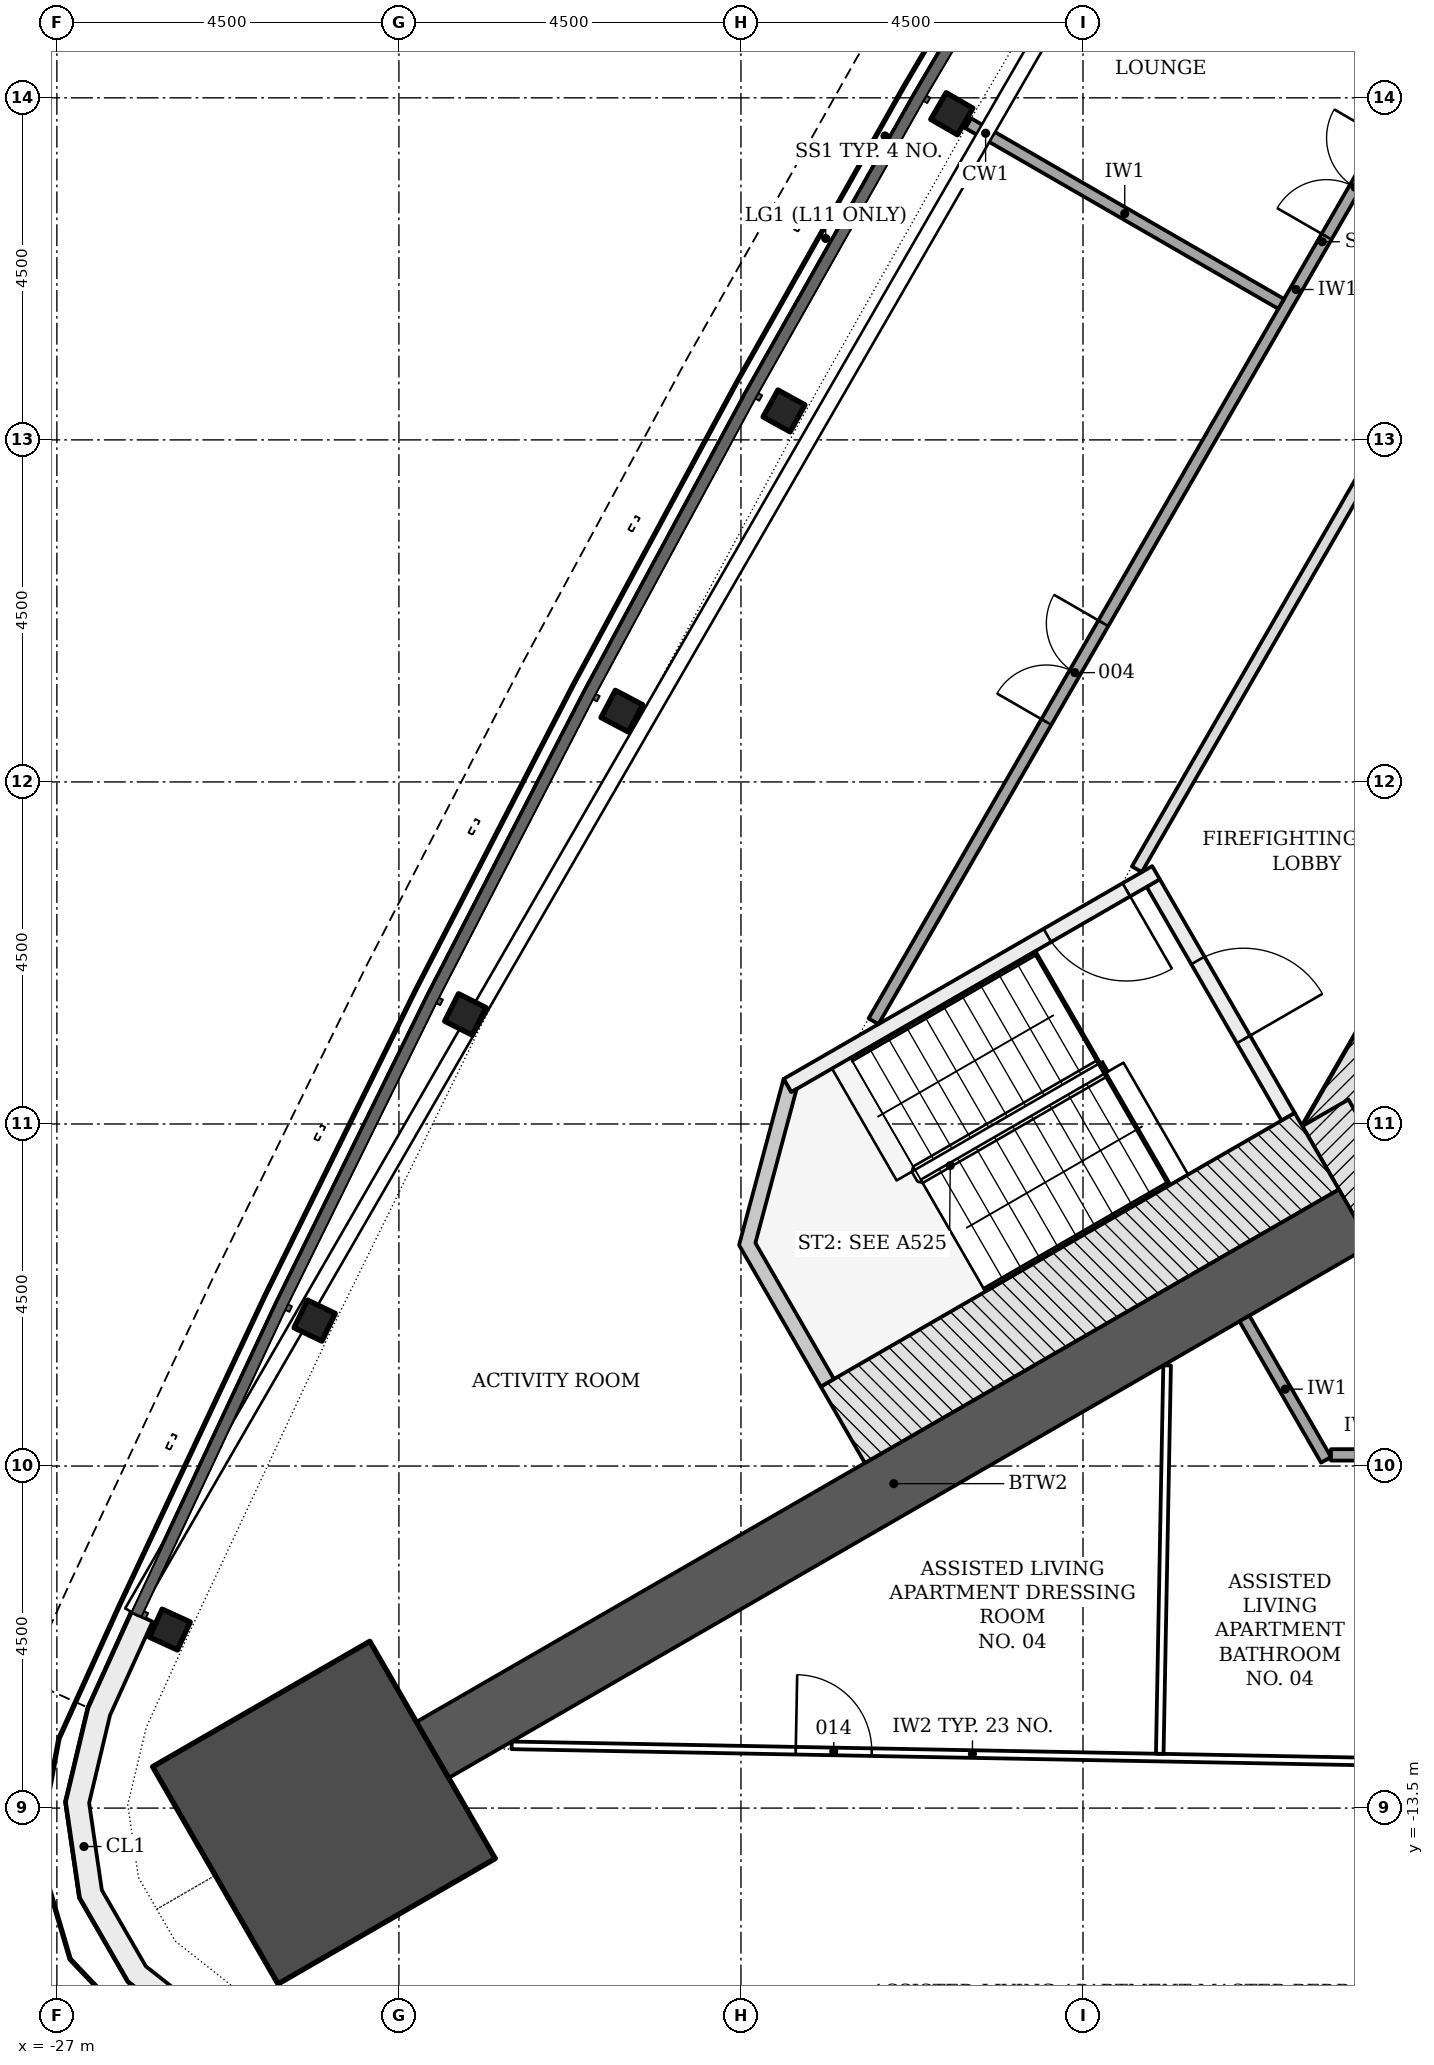
"""IFC4 building model, lengths in metres.
Left out: names, types, materials, properties, quantities, classifications, styles, units other than length and angle.
Written with IfcOpenShell. Run it as: python <this file> out.ifc"""

import sys

from ifc_helpers import new_model, si_unit, direction, frame, frame_2d, origin, origin_2d, place, context, subcontext, project, spatial, polyline, rectangle, i_section, outline, extrude, element, fill, save


model = new_model("IFC4")
c1 = context("Model", 3, precision=1e-05, world=origin(), true_north=direction((0.0, 1.0)))
c2 = subcontext(c1, "Body", "Model", "MODEL_VIEW")
j1 = project(units=[si_unit("LENGTHUNIT", "METRE"), si_unit("PLANEANGLEUNIT", "RADIAN")], contexts=[c1])
p1 = place(None, origin())
s1 = spatial("IfcSite", under=j1, at=p1, CompositionType="ELEMENT")
p2 = place(p1, origin())
s2 = spatial("IfcBuilding", under=s1, at=p2, CompositionType="ELEMENT")
p3 = place(p2, frame((0.0, 0.0, 45.6)))
s3 = spatial("IfcBuildingStorey", under=s2, at=p3, CompositionType="ELEMENT", Elevation=45.6)
p4 = place(p3, frame((-1.083, 11.281, -0.2), z_axis=(0.0, 0.0, 1.0), x_axis=(-0.500001446645, -0.866024568562, 0.0)))
e1 = element("IfcWall", 1, at=p4, inside=s3, PredefinedType="SHEAR", context=c2, shape_type="SweptSolid", body=[
    extrude(rectangle(XDim=18.458, YDim=0.7, at=frame_2d((9.229, 0.0))), origin(), (0.0, 0.0, 1.0), 3.6),
])
p5 = place(p4, frame((8.979, 0.0, 0.2)))
e2 = element("IfcOpeningElement", 2, at=p5, cuts=e1, PredefinedType="OPENING", context=c2, shape_type="SweptSolid", body=[
    extrude(rectangle(XDim=1.2, YDim=2.1, at=frame_2d((0.6, 1.05))), frame((0.0, 0.36, 0.0), z_axis=(0.0, -1.0, 0.0), x_axis=(1.0, 0.0, 0.0)), (0.0, 0.0, 1.0), 0.72),
])
p6 = place(p4, frame((11.029, 0.0, 0.2)))
e3 = element("IfcOpeningElement", 3, at=p6, cuts=e1, PredefinedType="OPENING", context=c2, shape_type="SweptSolid", body=[
    extrude(rectangle(XDim=1.2, YDim=2.1, at=frame_2d((0.6, 1.05))), frame((0.0, 0.36, 0.0), z_axis=(0.0, -1.0, 0.0), x_axis=(1.0, 0.0, 0.0)), (0.0, 0.0, 1.0), 0.72),
])
p7 = place(p3, frame((-10.311, -4.353, -0.2), z_axis=(0.0, 0.0, 1.0), x_axis=(0.500042739161, -0.866000726912, 0.0)))
e4 = element("IfcWall", 4, at=p7, inside=s3, PredefinedType="SHEAR", context=c2, shape_type="SweptSolid", body=[
    extrude(rectangle(XDim=2.771, YDim=0.7, at=frame_2d((1.386, 0.0))), origin(), (0.0, 0.0, 1.0), 3.6),
])
p8 = place(p3, frame((-9.922, -5.728, -0.2), z_axis=(0.0, 0.0, 1.0), x_axis=(-0.866021666006, -0.500006473966, 0.0)))
e5 = element("IfcWall", 5, at=p8, inside=s3, PredefinedType="SHEAR", context=c2, shape_type="SweptSolid", body=[
    extrude(rectangle(XDim=14.013, YDim=0.85, at=frame_2d((7.007, 0.0))), origin(), (0.0, 0.0, 1.0), 3.6),
])
p9 = place(p3, frame((-23.487, -13.56, -0.2), z_axis=(0.0, 0.0, 1.0), x_axis=(-0.866025403784, -0.5, 0.0)))
e6 = element("IfcColumn", 6, at=p9, inside=s3, PredefinedType="COLUMN", context=c2, shape_type="SweptSolid", body=[
    extrude(rectangle(XDim=3.3, YDim=3.3, at=origin_2d()), origin(), (0.0, 0.0, 1.0), 3.6),
])
for number, where, z_axis, x_axis in (
    (7, (-15.226, 8.791, -0.2), (0.0, 0.0, 1.0), (-0.5, -0.866, 0.0)),
    (8, (-17.434, 4.882, -0.2), (0.0, 0.0, 1.0), (-0.484, -0.875, 0.0)),
    (9, (-19.567, 0.931, -0.2), (0.0, 0.0, 1.0), (-0.467, -0.884, 0.0)),
    (10, (-21.626, -3.059, -0.2), (0.0, 0.0, 1.0), (-0.45, -0.893, 0.0)),
    (11, (-23.608, -7.086, -0.2), (0.0, 0.0, 1.0), (-0.433, -0.901, 0.0)),
    (12, (-25.514, -11.151, -0.2), (0.0, 0.0, 1.0), (-0.416, -0.909, 0.0)),
):
    element("IfcColumn", number, at=place(p3, frame(where, z_axis=z_axis, x_axis=x_axis)), inside=s3, PredefinedType="COLUMN", context=c2, shape_type="SweptSolid", body=[
        extrude(i_section(OverallWidth=0.404, OverallDepth=0.406, WebThickness=0.027, FlangeThickness=0.044, FilletRadius=0.015, at=origin_2d()), origin(), (0.0, 0.0, 1.0), 3.6),
    ])
p10 = place(p3, origin())
e13 = element("IfcWall", 13, at=p10, inside=s3, PredefinedType="NOTDEFINED", context=c2, shape_type="SweptSolid", body=[
    extrude(outline(polyline([(-26.014, -10.923), (-26.586, -12.181), (-26.881, -13.419), (-26.697, -14.679), (-26.061, -15.781), (-25.062, -16.57), (-23.842, -16.933), (-22.467, -17.068), (-22.437, -16.769), (-23.784, -16.638), (-24.921, -16.299), (-25.829, -15.581), (-26.408, -14.578), (-26.575, -13.433), (-26.301, -12.279), (-25.741, -11.047), (-26.014, -10.923)])), origin(), (0.0, 0.0, 1.0), 3.3),
])
p11 = place(p3, frame((-12.576, -1.331, -0.2), z_axis=(0.0, 0.0, 1.0), x_axis=(0.499970499736, -0.8660424351, 0.0)))
e14 = element("IfcWall", 14, at=p11, inside=s3, PredefinedType="SHEAR", context=c2, shape_type="SweptSolid", body=[
    extrude(rectangle(XDim=3.55, YDim=0.2, at=frame_2d((1.775, 0.0))), origin(), (0.0, 0.0, 1.0), 3.6),
])
p12 = place(p11, frame((1.175, 0.0, 0.2)))
e15 = element("IfcOpeningElement", 15, at=p12, cuts=e14, PredefinedType="OPENING", context=c2, shape_type="SweptSolid", body=[
    extrude(rectangle(XDim=1.2, YDim=2.1, at=frame_2d((0.6, 1.05))), frame((0.0, 0.11, 0.0), z_axis=(0.0, -1.0, 0.0), x_axis=(1.0, 0.0, 0.0)), (0.0, 0.0, 1.0), 0.22),
])
p13 = place(p3, frame((-12.539, -1.194, -0.2), z_axis=(0.0, 0.0, 1.0), x_axis=(-0.866045472092, -0.499965239061, 0.0)))
e16 = element("IfcWall", 16, at=p13, inside=s3, PredefinedType="SHEAR", context=c2, shape_type="SweptSolid", body=[
    extrude(rectangle(XDim=5.6, YDim=0.2, at=frame_2d((2.8, 0.0))), origin(), (0.0, 0.0, 1.0), 3.6),
])
p14 = place(p13, frame((0.45, 0.0, 0.2)))
e17 = element("IfcOpeningElement", 17, at=p14, cuts=e16, PredefinedType="OPENING", context=c2, shape_type="SweptSolid", body=[
    extrude(rectangle(XDim=1.2, YDim=2.1, at=frame_2d((0.6, 1.05))), frame((0.0, 0.11, 0.0), z_axis=(0.0, -1.0, 0.0), x_axis=(1.0, 0.0, 0.0)), (0.0, 0.0, 1.0), 0.22),
])
p15 = place(p3, frame((-10.424, -4.858, -0.2), z_axis=(0.0, 0.0, 1.0), x_axis=(-0.866033125095, -0.499986626058, 0.0)))
e18 = element("IfcWall", 18, at=p15, inside=s3, PredefinedType="SHEAR", context=c2, shape_type="SweptSolid", body=[
    extrude(rectangle(XDim=7.2, YDim=1.161, at=frame_2d((3.6, 0.0))), origin(), (0.0, 0.0, 1.0), 3.6),
])
p16 = place(p3, frame((0.0, 0.0, -0.2)))
e19 = element("IfcWall", 19, at=p16, inside=s3, PredefinedType="SHEAR", context=c2, shape_type="SweptSolid", body=[
    extrude(outline(polyline([(-17.439, -3.907), (-18.025, -6.093), (-16.95, -7.955), (-16.777, -7.855), (-17.81, -6.065), (-17.267, -4.039), (-17.339, -4.081), (-17.339, -4.081), (-17.339, -4.081), (-17.339, -4.081), (-17.339, -4.081), (-17.339, -4.081), (-17.339, -4.081), (-17.339, -4.081), (-17.339, -4.081), (-17.339, -4.081), (-17.339, -4.081), (-17.339, -4.081), (-17.339, -4.081), (-17.339, -4.081), (-17.339, -4.081), (-17.339, -4.081), (-17.339, -4.081), (-17.439, -3.907)])), origin(), (0.0, 0.0, 1.0), 3.6),
])
p17 = place(p3, frame((-16.256, -3.149, 0.0), z_axis=(0.0, 0.0, 1.0), x_axis=(0.499999683919, 0.866025586274, 0.0)))
e20 = element("IfcWall", 20, at=p17, inside=s3, PredefinedType="PARTITIONING", context=c2, shape_type="SweptSolid", body=[
    extrude(rectangle(XDim=22.234, YDim=0.15, at=frame_2d((11.117, 0.0))), origin(), (0.0, 0.0, 1.0), 2.778),
])
p18 = place(p17, frame((17.842, 0.0, 0.0)))
e21 = element("IfcOpeningElement", 21, at=p18, cuts=e20, PredefinedType="OPENING", context=c2, shape_type="SweptSolid", body=[
    extrude(rectangle(XDim=1.0, YDim=2.1, at=frame_2d((0.5, 1.05))), frame((0.0, 0.085, 0.0), z_axis=(0.0, -1.0, 0.0), x_axis=(1.0, 0.0, 0.0)), (0.0, 0.0, 1.0), 0.17),
])
p19 = place(p17, frame((15.26, 0.0, 0.0)))
e22 = element("IfcOpeningElement", 22, at=p19, cuts=e20, PredefinedType="OPENING", context=c2, shape_type="SweptSolid", body=[
    extrude(rectangle(XDim=1.0, YDim=2.1, at=frame_2d((0.5, 1.05))), frame((0.0, 0.085, 0.0), z_axis=(0.0, -1.0, 0.0), x_axis=(1.0, 0.0, 0.0)), (0.0, 0.0, 1.0), 0.17),
])
p20 = place(p17, frame((11.92, 0.0, 0.0)))
e23 = element("IfcOpeningElement", 23, at=p20, cuts=e20, PredefinedType="OPENING", context=c2, shape_type="SweptSolid", body=[
    extrude(rectangle(XDim=1.5, YDim=2.1, at=frame_2d((0.75, 1.05))), frame((0.0, 0.085, 0.0), z_axis=(0.0, -1.0, 0.0), x_axis=(1.0, 0.0, 0.0)), (0.0, 0.0, 1.0), 0.17),
])
p21 = place(p17, frame((4.547, 0.0, 0.0)))
e24 = element("IfcOpeningElement", 24, at=p21, cuts=e20, PredefinedType="OPENING", context=c2, shape_type="SweptSolid", body=[
    extrude(rectangle(XDim=1.5, YDim=2.1, at=frame_2d((0.75, 1.05))), frame((0.0, 0.085, 0.0), z_axis=(0.0, -1.0, 0.0), x_axis=(1.0, 0.0, 0.0)), (0.0, 0.0, 1.0), 0.17),
])
p22 = place(p3, frame((-4.407, 13.374, 0.0), z_axis=(0.0, 0.0, 1.0), x_axis=(-0.499997181693, -0.866027030928, 0.0)))
e25 = element("IfcWall", 25, at=p22, inside=s3, PredefinedType="PARTITIONING", context=c2, shape_type="SweptSolid", body=[
    extrude(rectangle(XDim=16.77, YDim=0.15, at=frame_2d((8.385, 0.0))), origin(), (0.0, 0.0, 1.0), 2.778),
])
p23 = place(p22, frame((8.879, 0.0, 0.0)))
e26 = element("IfcOpeningElement", 26, at=p23, cuts=e25, PredefinedType="OPENING", context=c2, shape_type="SweptSolid", body=[
    extrude(rectangle(XDim=1.0, YDim=2.1, at=frame_2d((0.5, 1.05))), frame((0.0, 0.085, 0.0), z_axis=(0.0, -1.0, 0.0), x_axis=(1.0, 0.0, 0.0)), (0.0, 0.0, 1.0), 0.17),
])
p24 = place(p3, frame((-11.376, -7.059, 0.0), z_axis=(0.0, 0.0, 1.0), x_axis=(0.500076779081, -0.865981070823, 0.0)))
e27 = element("IfcWall", 27, at=p24, inside=s3, PredefinedType="PARTITIONING", context=c2, shape_type="SweptSolid", body=[
    extrude(rectangle(XDim=2.147, YDim=0.15, at=frame_2d((1.074, 0.0))), origin(), (0.0, 0.0, 1.0), 3.4),
])
p25 = place(p3, frame((-10.238, -8.853, 0.0), z_axis=(0.0, 0.0, 1.0), x_axis=(1.0, 0.0, 0.0)))
e28 = element("IfcWall", 28, at=p25, inside=s3, PredefinedType="PARTITIONING", context=c2, shape_type="SweptSolid", body=[
    extrude(rectangle(XDim=0.859, YDim=0.15, at=frame_2d((0.43, 0.0))), origin(), (0.0, 0.0, 1.0), 3.4),
])
p26 = place(p3, frame((-15.009, 8.666, 0.0), z_axis=(0.0, 0.0, 1.0), x_axis=(0.866028196007, -0.499995163697, 0.0)))
e29 = element("IfcWall", 29, at=p26, inside=s3, PredefinedType="PARTITIONING", context=c2, shape_type="SweptSolid", body=[
    extrude(rectangle(XDim=4.753, YDim=0.15, at=frame_2d((2.376, 0.0))), origin(), (0.0, 0.0, 1.0), 2.778),
])
p27 = place(p3, frame((-21.017, -12.675, 0.0), z_axis=(0.0, 0.0, 1.0), x_axis=(0.999821316728, -0.018903296414, 0.0)))
e30 = element("IfcWall", 30, at=p27, inside=s3, PredefinedType="PARTITIONING", context=c2, shape_type="SweptSolid", body=[
    extrude(rectangle(XDim=12.127, YDim=0.1, at=frame_2d((6.064, 0.0))), origin(), (0.0, 0.0, 1.0), 2.778),
])
p28 = place(p27, frame((3.739, 0.0, 0.0)))
e31 = element("IfcOpeningElement", 31, at=p28, cuts=e30, PredefinedType="OPENING", context=c2, shape_type="SweptSolid", body=[
    extrude(rectangle(XDim=1.0, YDim=2.1, at=frame_2d((0.5, 1.05))), frame((0.0, 0.06, 0.0), z_axis=(0.0, -1.0, 0.0), x_axis=(1.0, 0.0, 0.0)), (0.0, 0.0, 1.0), 0.12),
])
p29 = place(p3, frame((-12.49, -12.786, 0.0), z_axis=(0.0, 0.0, 1.0), x_axis=(0.018916824658, 0.999821060863, 0.0)))
e32 = element("IfcWall", 32, at=p29, inside=s3, PredefinedType="PARTITIONING", context=c2, shape_type="SweptSolid", body=[
    extrude(rectangle(XDim=5.111, YDim=0.1, at=frame_2d((2.555, 0.0))), origin(), (0.0, 0.0, 1.0), 3.4),
])
p30 = place(p3, frame((-10.96, 10.538, 0.0), z_axis=(0.0, 0.0, 1.0), x_axis=(0.856405167788, -0.516304356544, 0.0)))
e33 = element("IfcWall", 33, at=p30, inside=s3, PredefinedType="PARTITIONING", context=c2, shape_type="SweptSolid", body=[
    extrude(rectangle(XDim=2.182, YDim=0.1, at=frame_2d((1.091, 0.0))), origin(), (0.0, 0.0, 1.0), 3.4),
])
p31 = place(p12, origin())
e34 = element("IfcDoor", 34, at=p31, inside=s3, OperationType="SINGLE_SWING_RIGHT", PredefinedType="DOOR", context=c2, shape_type="SweptSolid", body=[
    extrude(rectangle(XDim=1.2, YDim=2.1, at=frame_2d((0.6, 1.05))), frame((0.0, 0.025, 0.0), z_axis=(0.0, -1.0, 0.0), x_axis=(1.0, 0.0, 0.0)), (0.0, 0.0, 1.0), 0.05),
])
fill(e15, e34)
p32 = place(p14, origin())
e35 = element("IfcDoor", 35, at=p32, inside=s3, OperationType="SINGLE_SWING_LEFT", PredefinedType="DOOR", context=c2, shape_type="SweptSolid", body=[
    extrude(rectangle(XDim=1.2, YDim=2.1, at=frame_2d((0.6, 1.05))), frame((0.0, 0.025, 0.0), z_axis=(0.0, -1.0, 0.0), x_axis=(1.0, 0.0, 0.0)), (0.0, 0.0, 1.0), 0.05),
])
fill(e17, e35)
p33 = place(p20, origin())
e36 = element("IfcDoor", 36, at=p33, inside=s3, OperationType="DOUBLE_DOOR_SINGLE_SWING", PredefinedType="DOOR", context=c2, shape_type="SweptSolid", body=[
    extrude(rectangle(XDim=1.5, YDim=2.1, at=frame_2d((0.75, 1.05))), frame((0.0, 0.025, 0.0), z_axis=(0.0, -1.0, 0.0), x_axis=(1.0, 0.0, 0.0)), (0.0, 0.0, 1.0), 0.05),
])
fill(e23, e36)
p34 = place(p21, origin())
e37 = element("IfcDoor", 37, at=p34, inside=s3, OperationType="DOUBLE_DOOR_SINGLE_SWING", PredefinedType="DOOR", context=c2, shape_type="SweptSolid", body=[
    extrude(rectangle(XDim=1.5, YDim=2.1, at=frame_2d((0.75, 1.05))), frame((0.0, 0.025, 0.0), z_axis=(0.0, -1.0, 0.0), x_axis=(1.0, 0.0, 0.0)), (0.0, 0.0, 1.0), 0.05),
])
fill(e24, e37)
p35 = place(p28, origin())
e38 = element("IfcDoor", 38, at=p35, inside=s3, OperationType="SINGLE_SWING_LEFT", PredefinedType="DOOR", context=c2, shape_type="SweptSolid", body=[
    extrude(rectangle(XDim=1.0, YDim=2.1, at=frame_2d((0.5, 1.05))), frame((0.0, 0.025, 0.0), z_axis=(0.0, -1.0, 0.0), x_axis=(1.0, 0.0, 0.0)), (0.0, 0.0, 1.0), 0.05),
])
fill(e31, e38)
save(model, sys.argv[1])
